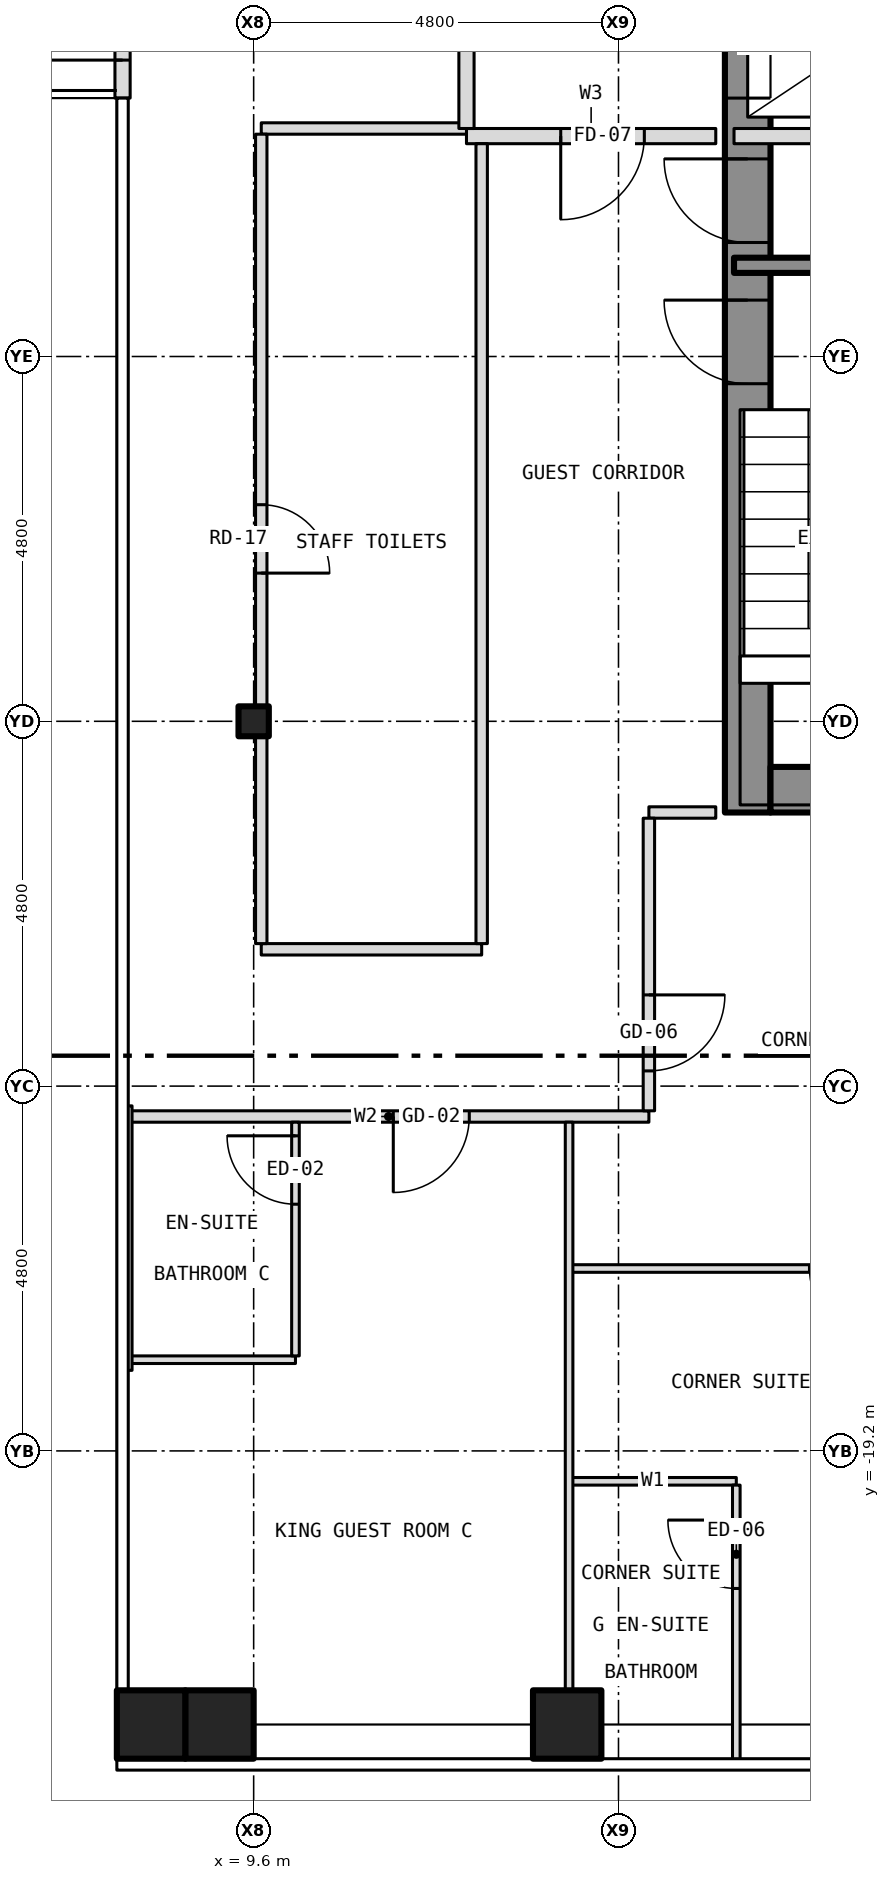
"""IFC4 building model, lengths in metres.
Left out: names, types, materials, properties, quantities, classifications, styles, units other than length and angle.
Written with IfcOpenShell. Run it as: python <this file> out.ifc"""

import sys

from ifc_helpers import new_model, si_unit, direction, frame, frame_2d, origin, origin_2d, place, context, subcontext, project, spatial, rectangle, hollow_rectangle, i_section, extrude, element, fill, save


model = new_model("IFC4")
c1 = context("Model", 3, precision=1e-05, world=origin(), true_north=direction((0.0, 1.0)))
c2 = subcontext(c1, "Body", "Model", "MODEL_VIEW")
j1 = project(units=[si_unit("LENGTHUNIT", "METRE"), si_unit("PLANEANGLEUNIT", "RADIAN")], contexts=[c1])
p1 = place(None, origin())
s1 = spatial("IfcSite", under=j1, at=p1, CompositionType="ELEMENT")
p2 = place(p1, origin())
s2 = spatial("IfcBuilding", under=s1, at=p2, CompositionType="ELEMENT")
p3 = place(p2, frame((0.0, 0.0, 131.0)))
s3 = spatial("IfcBuildingStorey", under=s2, at=p3, CompositionType="ELEMENT", Elevation=131.0)
for number, where, z_axis, x_axis in (
    (1, (9.15, -22.8, -0.15), (0.0, 0.0, 1.0), (1.0, 0.0, 0.0)),
    (2, (13.725, -22.8, -0.15), (0.0, 0.0, 1.0), (1.0, 0.0, 0.0)),
    (3, (8.25, -22.8, -0.15), (0.0, 0.0, 1.0), (1.0, 0.0, 0.0)),
):
    element("IfcColumn", number, at=place(p3, frame(where, z_axis=z_axis, x_axis=x_axis)), inside=s3, PredefinedType="COLUMN", context=c2, shape_type="SweptSolid", body=[
        extrude(hollow_rectangle(XDim=0.9, YDim=0.9, WallThickness=0.05, at=origin_2d()), origin(), (0.0, 0.0, 1.0), 3.5),
    ])
p4 = place(p3, frame((9.6, -9.6, -0.15), z_axis=(0.0, 0.0, 1.0), x_axis=(1.0, 0.0, 0.0)))
e4 = element("IfcColumn", 4, at=p4, inside=s3, PredefinedType="COLUMN", context=c2, shape_type="SweptSolid", body=[
    extrude(i_section(OverallWidth=0.399, OverallDepth=0.394, WebThickness=0.023, FlangeThickness=0.037, at=origin_2d()), origin(), (0.0, 0.0, 1.0), 3.5),
])
p5 = place(p3, frame((16.1, -10.8, 0.0), z_axis=(0.0, 0.0, 1.0), x_axis=(0.0, 1.0, 0.0)))
e5 = element("IfcWall", 5, at=p5, inside=s3, PredefinedType="SHEAR", context=c2, shape_type="SweptSolid", body=[
    extrude(rectangle(XDim=21.6, YDim=0.6, at=frame_2d((10.8, 0.0))), origin(), (0.0, 0.0, 1.0), 3.25),
])
p6 = place(p5, frame((9.4, 0.0, 0.0)))
e6 = element("IfcOpeningElement", 6, at=p6, cuts=e5, PredefinedType="OPENING", context=c2, shape_type="SweptSolid", body=[
    extrude(rectangle(XDim=1.1, YDim=2.1, at=frame_2d((0.55, 1.05))), frame((0.0, 0.312, 0.0), z_axis=(0.0, -1.0, 0.0), x_axis=(1.0, 0.0, 0.0)), (0.0, 0.0, 1.0), 0.624),
])
p7 = place(p5, frame((11.5, 0.0, 0.0)))
e7 = element("IfcOpeningElement", 7, at=p7, cuts=e5, PredefinedType="OPENING", context=c2, shape_type="SweptSolid", body=[
    extrude(rectangle(XDim=1.1, YDim=2.1, at=frame_2d((0.55, 1.05))), frame((0.0, 0.312, 0.0), z_axis=(0.0, -1.0, 0.0), x_axis=(1.0, 0.0, 0.0)), (0.0, 0.0, 1.0), 0.624),
])
p8 = place(p5, frame((13.6, 0.0, 0.0)))
e8 = element("IfcOpeningElement", 8, at=p8, cuts=e5, PredefinedType="OPENING", context=c2, shape_type="SweptSolid", body=[
    extrude(rectangle(XDim=1.1, YDim=2.1, at=frame_2d((0.55, 1.05))), frame((0.0, 0.312, 0.0), z_axis=(0.0, -1.0, 0.0), x_axis=(1.0, 0.0, 0.0)), (0.0, 0.0, 1.0), 0.624),
])
p9 = place(p5, frame((15.7, 0.0, 0.0)))
e9 = element("IfcOpeningElement", 9, at=p9, cuts=e5, PredefinedType="OPENING", context=c2, shape_type="SweptSolid", body=[
    extrude(rectangle(XDim=1.1, YDim=2.1, at=frame_2d((0.55, 1.05))), frame((0.0, 0.312, 0.0), z_axis=(0.0, -1.0, 0.0), x_axis=(1.0, 0.0, 0.0)), (0.0, 0.0, 1.0), 0.624),
])
p10 = place(p5, frame((17.8, 0.0, 0.0)))
e10 = element("IfcOpeningElement", 10, at=p10, cuts=e5, PredefinedType="OPENING", context=c2, shape_type="SweptSolid", body=[
    extrude(rectangle(XDim=1.1, YDim=2.1, at=frame_2d((0.55, 1.05))), frame((0.0, 0.312, 0.0), z_axis=(0.0, -1.0, 0.0), x_axis=(1.0, 0.0, 0.0)), (0.0, 0.0, 1.0), 0.624),
])
p11 = place(p5, frame((5.642, 0.0, 0.0)))
e11 = element("IfcOpeningElement", 11, at=p11, cuts=e5, PredefinedType="OPENING", context=c2, shape_type="SweptSolid", body=[
    extrude(rectangle(XDim=1.1, YDim=2.1, at=frame_2d((0.55, 1.05))), frame((0.0, 0.312, 0.0), z_axis=(0.0, -1.0, 0.0), x_axis=(1.0, 0.0, 0.0)), (0.0, 0.0, 1.0), 0.624),
])
p12 = place(p5, frame((7.5, 0.0, 0.0)))
e12 = element("IfcOpeningElement", 12, at=p12, cuts=e5, PredefinedType="OPENING", context=c2, shape_type="SweptSolid", body=[
    extrude(rectangle(XDim=1.1, YDim=2.1, at=frame_2d((0.55, 1.05))), frame((0.0, 0.312, 0.0), z_axis=(0.0, -1.0, 0.0), x_axis=(1.0, 0.0, 0.0)), (0.0, 0.0, 1.0), 0.624),
])
p13 = place(p3, frame((16.4, -10.5, 0.0), z_axis=(0.0, 0.0, 1.0), x_axis=(1.0, 0.0, 0.0)))
e13 = element("IfcWall", 13, at=p13, inside=s3, PredefinedType="SHEAR", context=c2, shape_type="SweptSolid", body=[
    extrude(rectangle(XDim=5.8, YDim=0.6, at=frame_2d((2.9, 0.0))), origin(), (0.0, 0.0, 1.0), 3.25),
])
p14 = place(p3, frame((7.875, -1.4, 0.0), z_axis=(0.0, 0.0, 1.0), x_axis=(0.0, 1.0, 0.0)))
e14 = element("IfcWall", 14, at=p14, inside=s3, PredefinedType="SOLIDWALL", context=c2, shape_type="SweptSolid", body=[
    extrude(rectangle(XDim=2.8, YDim=0.2, at=frame_2d((1.4, 0.0))), origin(), (0.0, 0.0, 1.0), 3.5),
])
p15 = place(p14, frame((0.5, 0.0, 0.0)))
e15 = element("IfcOpeningElement", 15, at=p15, cuts=e14, PredefinedType="OPENING", context=c2, shape_type="SweptSolid", body=[
    extrude(rectangle(XDim=1.8, YDim=2.1, at=frame_2d((0.9, 1.05))), frame((0.0, 0.112, 0.0), z_axis=(0.0, -1.0, 0.0), x_axis=(1.0, 0.0, 0.0)), (0.0, 0.0, 1.0), 0.224),
])
for number, where, z_axis, x_axis in (
    (16, (13.75, -19.6, 0.0), (0.0, 0.0, 1.0), (1.0, 0.0, 0.0)),
    (17, (7.95, -18.0, 0.0), (0.0, 0.0, 1.0), (1.0, 0.0, 0.0)),
):
    element("IfcWall", number, at=place(p3, frame(where, z_axis=z_axis, x_axis=x_axis)), inside=s3, PredefinedType="PARTITIONING", context=c2, shape_type="SweptSolid", body=[
        extrude(rectangle(XDim=2.2, YDim=0.1, at=frame_2d((1.1, 0.0))), origin(), (0.0, 0.0, 1.0), 3.35),
    ])
p16 = place(p3, frame((13.75, -16.8, 0.0), z_axis=(0.0, 0.0, 1.0), x_axis=(1.0, 0.0, 0.0)))
e18 = element("IfcWall", 18, at=p16, inside=s3, PredefinedType="PARTITIONING", context=c2, shape_type="SweptSolid", body=[
    extrude(rectangle(XDim=9.53, YDim=0.1, at=frame_2d((4.765, 0.0))), origin(), (0.0, 0.0, 1.0), 3.35),
])
p17 = place(p16, frame((3.163, 0.0, 0.0)))
e19 = element("IfcOpeningElement", 19, at=p17, cuts=e18, PredefinedType="OPENING", context=c2, shape_type="SweptSolid", body=[
    extrude(rectangle(XDim=0.9, YDim=2.1, at=frame_2d((0.45, 1.05))), frame((0.0, 0.062, 0.0), z_axis=(0.0, -1.0, 0.0), x_axis=(1.0, 0.0, 0.0)), (0.0, 0.0, 1.0), 0.124),
])
p18 = place(p3, frame((7.95, -14.8, 0.0), z_axis=(0.0, 0.0, 1.0), x_axis=(1.0, 0.0, 0.0)))
e20 = element("IfcWall", 20, at=p18, inside=s3, PredefinedType="PARTITIONING", context=c2, shape_type="SweptSolid", body=[
    extrude(rectangle(XDim=6.85, YDim=0.15, at=frame_2d((3.425, 0.0))), origin(), (0.0, 0.0, 1.0), 3.35),
])
p19 = place(p18, frame((3.487, 0.0, 0.0)))
e21 = element("IfcOpeningElement", 21, at=p19, cuts=e20, PredefinedType="OPENING", context=c2, shape_type="SweptSolid", body=[
    extrude(rectangle(XDim=1.0, YDim=2.1, at=frame_2d((0.5, 1.05))), frame((0.0, 0.087, 0.0), z_axis=(0.0, -1.0, 0.0), x_axis=(1.0, 0.0, 0.0)), (0.0, 0.0, 1.0), 0.174),
])
p20 = place(p3, frame((9.7, -12.6, 0.0), z_axis=(0.0, 0.0, 1.0), x_axis=(1.0, 0.0, 0.0)))
e22 = element("IfcWall", 22, at=p20, inside=s3, PredefinedType="PARTITIONING", context=c2, shape_type="SweptSolid", body=[
    extrude(rectangle(XDim=2.9, YDim=0.15, at=frame_2d((1.45, 0.0))), origin(), (0.0, 0.0, 1.0), 3.35),
])
p21 = place(p3, frame((14.8, -10.8, 0.0), z_axis=(0.0, 0.0, 1.0), x_axis=(1.0, 0.0, 0.0)))
e23 = element("IfcWall", 23, at=p21, inside=s3, PredefinedType="PARTITIONING", context=c2, shape_type="SweptSolid", body=[
    extrude(rectangle(XDim=0.88, YDim=0.15, at=frame_2d((0.44, 0.0))), origin(), (0.0, 0.0, 1.0), 3.35),
])
p22 = place(p3, frame((15.92, -3.6, 0.0), z_axis=(0.0, 0.0, 1.0), x_axis=(1.0, 0.0, 0.0)))
e24 = element("IfcWall", 24, at=p22, inside=s3, PredefinedType="SHEAR", context=c2, shape_type="SweptSolid", body=[
    extrude(rectangle(XDim=4.08, YDim=0.2, at=frame_2d((2.04, 0.0))), origin(), (0.0, 0.0, 1.0), 3.25),
])
p23 = place(p3, frame((12.4, -1.9, 0.0), z_axis=(0.0, 0.0, 1.0), x_axis=(1.0, 0.0, 0.0)))
e25 = element("IfcWall", 25, at=p23, inside=s3, PredefinedType="PARTITIONING", context=c2, shape_type="SweptSolid", body=[
    extrude(rectangle(XDim=3.28, YDim=0.2, at=frame_2d((1.64, 0.0))), origin(), (0.0, 0.0, 1.0), 3.35),
])
p24 = place(p23, frame((1.24, 0.0, 0.0)))
e26 = element("IfcOpeningElement", 26, at=p24, cuts=e25, PredefinedType="OPENING", context=c2, shape_type="SweptSolid", body=[
    extrude(rectangle(XDim=1.1, YDim=2.1, at=frame_2d((0.55, 1.05))), frame((0.0, 0.112, 0.0), z_axis=(0.0, -1.0, 0.0), x_axis=(1.0, 0.0, 0.0)), (0.0, 0.0, 1.0), 0.224),
])
p25 = place(p3, frame((15.92, -1.9, 0.0), z_axis=(0.0, 0.0, 1.0), x_axis=(1.0, 0.0, 0.0)))
e27 = element("IfcWall", 27, at=p25, inside=s3, PredefinedType="PARTITIONING", context=c2, shape_type="SweptSolid", body=[
    extrude(rectangle(XDim=6.76, YDim=0.2, at=frame_2d((3.38, 0.0))), origin(), (0.0, 0.0, 1.0), 3.25),
])
p26 = place(p25, frame((3.74, 0.0, 0.0)))
e28 = element("IfcOpeningElement", 28, at=p26, cuts=e27, PredefinedType="OPENING", context=c2, shape_type="SweptSolid", body=[
    extrude(rectangle(XDim=0.9, YDim=2.1, at=frame_2d((0.45, 1.05))), frame((0.0, 0.112, 0.0), z_axis=(0.0, -1.0, 0.0), x_axis=(1.0, 0.0, 0.0)), (0.0, 0.0, 1.0), 0.224),
])
p27 = place(p3, frame((9.7, -1.8, 0.0), z_axis=(0.0, 0.0, 1.0), x_axis=(1.0, 0.0, 0.0)))
e29 = element("IfcWall", 29, at=p27, inside=s3, PredefinedType="PARTITIONING", context=c2, shape_type="SweptSolid", body=[
    extrude(rectangle(XDim=2.7, YDim=0.15, at=frame_2d((1.35, 0.0))), origin(), (0.0, 0.0, 1.0), 3.35),
])
p28 = place(p3, frame((7.95, -18.14, 0.0), z_axis=(0.0, 0.0, 1.0), x_axis=(0.0, 1.0, 0.0)))
e30 = element("IfcWall", 30, at=p28, inside=s3, PredefinedType="PARTITIONING", context=c2, shape_type="SweptSolid", body=[
    extrude(rectangle(XDim=3.48, YDim=0.1, at=frame_2d((1.74, 0.0))), origin(), (0.0, 0.0, 1.0), 2.733),
])
p29 = place(p3, frame((9.7, -12.525, 0.0), z_axis=(0.0, 0.0, 1.0), x_axis=(0.0, 1.0, 0.0)))
e31 = element("IfcWall", 31, at=p29, inside=s3, PredefinedType="PARTITIONING", context=c2, shape_type="SweptSolid", body=[
    extrude(rectangle(XDim=2.726, YDim=0.15, at=frame_2d((1.363, 0.0))), origin(), (0.0, 0.0, 1.0), 2.728),
])
p30 = place(p3, frame((9.7, -9.799, 0.0), z_axis=(0.0, 0.0, 1.0), x_axis=(0.0, 1.0, 0.0)))
e32 = element("IfcWall", 32, at=p30, inside=s3, PredefinedType="PARTITIONING", context=c2, shape_type="SweptSolid", body=[
    extrude(rectangle(XDim=0.398, YDim=0.15, at=frame_2d((0.199, 0.0))), origin(), (0.0, 0.0, 1.0), 3.35),
])
p31 = place(p3, frame((9.7, -9.401, 0.0), z_axis=(0.0, 0.0, 1.0), x_axis=(0.0, 1.0, 0.0)))
e33 = element("IfcWall", 33, at=p31, inside=s3, PredefinedType="PARTITIONING", context=c2, shape_type="SweptSolid", body=[
    extrude(rectangle(XDim=7.526, YDim=0.15, at=frame_2d((3.763, 0.0))), origin(), (0.0, 0.0, 1.0), 2.728),
])
p32 = place(p31, frame((1.751, 0.0, 0.0)))
e34 = element("IfcOpeningElement", 34, at=p32, cuts=e33, PredefinedType="OPENING", context=c2, shape_type="SweptSolid", body=[
    extrude(rectangle(XDim=0.9, YDim=2.1, at=frame_2d((0.45, 1.05))), frame((0.0, 0.087, 0.0), z_axis=(0.0, -1.0, 0.0), x_axis=(1.0, 0.0, 0.0)), (0.0, 0.0, 1.0), 0.174),
])
p33 = place(p3, frame((10.15, -17.95, 0.0), z_axis=(0.0, 0.0, 1.0), x_axis=(0.0, 1.0, 0.0)))
e35 = element("IfcWall", 35, at=p33, inside=s3, PredefinedType="PARTITIONING", context=c2, shape_type="SweptSolid", body=[
    extrude(rectangle(XDim=3.075, YDim=0.1, at=frame_2d((1.538, 0.0))), origin(), (0.0, 0.0, 1.0), 3.35),
])
p34 = place(p33, frame((1.996, 0.0, 0.0)))
e36 = element("IfcOpeningElement", 36, at=p34, cuts=e35, PredefinedType="OPENING", context=c2, shape_type="SweptSolid", body=[
    extrude(rectangle(XDim=0.9, YDim=2.1, at=frame_2d((0.45, 1.05))), frame((0.0, 0.062, 0.0), z_axis=(0.0, -1.0, 0.0), x_axis=(1.0, 0.0, 0.0)), (0.0, 0.0, 1.0), 0.124),
])
p35 = place(p3, frame((12.4, -1.8, 0.0), z_axis=(0.0, 0.0, 1.0), x_axis=(0.0, 1.0, 0.0)))
e37 = element("IfcWall", 37, at=p35, inside=s3, PredefinedType="PARTITIONING", context=c2, shape_type="SweptSolid", body=[
    extrude(rectangle(XDim=4.0, YDim=0.2, at=frame_2d((2.0, 0.0))), origin(), (0.0, 0.0, 1.0), 3.35),
])
p36 = place(p35, frame((1.25, 0.0, 0.0)))
e38 = element("IfcOpeningElement", 38, at=p36, cuts=e37, PredefinedType="OPENING", context=c2, shape_type="SweptSolid", body=[
    extrude(rectangle(XDim=1.1, YDim=2.1, at=frame_2d((0.55, 1.05))), frame((0.0, 0.112, 0.0), z_axis=(0.0, -1.0, 0.0), x_axis=(1.0, 0.0, 0.0)), (0.0, 0.0, 1.0), 0.224),
])
p37 = place(p3, frame((12.6, -12.525, 0.0), z_axis=(0.0, 0.0, 1.0), x_axis=(0.0, 1.0, 0.0)))
e39 = element("IfcWall", 39, at=p37, inside=s3, PredefinedType="PARTITIONING", context=c2, shape_type="SweptSolid", body=[
    extrude(rectangle(XDim=10.525, YDim=0.15, at=frame_2d((5.262, 0.0))), origin(), (0.0, 0.0, 1.0), 3.35),
])
p38 = place(p3, frame((13.75, -22.68, 0.0), z_axis=(0.0, 0.0, 1.0), x_axis=(0.0, 1.0, 0.0)))
e40 = element("IfcWall", 40, at=p38, inside=s3, PredefinedType="PARTITIONING", context=c2, shape_type="SweptSolid", body=[
    extrude(rectangle(XDim=7.805, YDim=0.1, at=frame_2d((3.902, 0.0))), origin(), (0.0, 0.0, 1.0), 3.35),
])
p39 = place(p3, frame((14.8, -14.725, 0.0), z_axis=(0.0, 0.0, 1.0), x_axis=(0.0, 1.0, 0.0)))
e41 = element("IfcWall", 41, at=p39, inside=s3, PredefinedType="PARTITIONING", context=c2, shape_type="SweptSolid", body=[
    extrude(rectangle(XDim=3.85, YDim=0.15, at=frame_2d((1.925, 0.0))), origin(), (0.0, 0.0, 1.0), 3.35),
])
p40 = place(p39, frame((0.525, 0.0, 0.0)))
e42 = element("IfcOpeningElement", 42, at=p40, cuts=e41, PredefinedType="OPENING", context=c2, shape_type="SweptSolid", body=[
    extrude(rectangle(XDim=1.0, YDim=2.1, at=frame_2d((0.5, 1.05))), frame((0.0, 0.087, 0.0), z_axis=(0.0, -1.0, 0.0), x_axis=(1.0, 0.0, 0.0)), (0.0, 0.0, 1.0), 0.174),
])
p41 = place(p3, frame((15.95, -23.28, 0.0), z_axis=(0.0, 0.0, 1.0), x_axis=(0.0, 1.0, 0.0)))
e43 = element("IfcWall", 43, at=p41, inside=s3, PredefinedType="PARTITIONING", context=c2, shape_type="SweptSolid", body=[
    extrude(rectangle(XDim=3.63, YDim=0.1, at=frame_2d((1.815, 0.0))), origin(), (0.0, 0.0, 1.0), 3.35),
])
p42 = place(p41, frame((2.27, 0.0, 0.0)))
e44 = element("IfcOpeningElement", 44, at=p42, cuts=e43, PredefinedType="OPENING", context=c2, shape_type="SweptSolid", body=[
    extrude(rectangle(XDim=0.9, YDim=2.1, at=frame_2d((0.45, 1.05))), frame((0.0, 0.062, 0.0), z_axis=(0.0, -1.0, 0.0), x_axis=(1.0, 0.0, 0.0)), (0.0, 0.0, 1.0), 0.124),
])
p43 = place(p15, origin())
e45 = element("IfcDoor", 45, at=p43, inside=s3, OperationType="DOUBLE_DOOR_DOUBLE_SWING", PredefinedType="DOOR", context=c2, shape_type="SweptSolid", body=[
    extrude(rectangle(XDim=1.8, YDim=2.1, at=frame_2d((0.9, 1.05))), frame((0.0, 0.025, 0.0), z_axis=(0.0, -1.0, 0.0), x_axis=(1.0, 0.0, 0.0)), (0.0, 0.0, 1.0), 0.05),
])
fill(e15, e45)
p44 = place(p6, origin())
e46 = element("IfcDoor", 46, at=p44, inside=s3, OperationType="SLIDING_TO_LEFT", PredefinedType="DOOR", context=c2, shape_type="SweptSolid", body=[
    extrude(rectangle(XDim=1.1, YDim=2.1, at=frame_2d((0.55, 1.05))), frame((0.0, 0.025, 0.0), z_axis=(0.0, -1.0, 0.0), x_axis=(1.0, 0.0, 0.0)), (0.0, 0.0, 1.0), 0.05),
])
fill(e6, e46)
p45 = place(p11, origin())
e47 = element("IfcDoor", 47, at=p45, inside=s3, OperationType="SINGLE_SWING_RIGHT", PredefinedType="DOOR", context=c2, shape_type="SweptSolid", body=[
    extrude(rectangle(XDim=1.1, YDim=2.1, at=frame_2d((0.55, 1.05))), frame((0.0, 0.025, 0.0), z_axis=(0.0, -1.0, 0.0), x_axis=(1.0, 0.0, 0.0)), (0.0, 0.0, 1.0), 0.05),
])
fill(e11, e47)
p46 = place(p12, origin())
e48 = element("IfcDoor", 48, at=p46, inside=s3, OperationType="SINGLE_SWING_RIGHT", PredefinedType="DOOR", context=c2, shape_type="SweptSolid", body=[
    extrude(rectangle(XDim=1.1, YDim=2.1, at=frame_2d((0.55, 1.05))), frame((0.0, 0.025, 0.0), z_axis=(0.0, -1.0, 0.0), x_axis=(1.0, 0.0, 0.0)), (0.0, 0.0, 1.0), 0.05),
])
fill(e12, e48)
p47 = place(p24, origin())
e49 = element("IfcDoor", 49, at=p47, inside=s3, OperationType="SINGLE_SWING_LEFT", PredefinedType="DOOR", context=c2, shape_type="SweptSolid", body=[
    extrude(rectangle(XDim=1.1, YDim=2.1, at=frame_2d((0.55, 1.05))), frame((0.0, 0.025, 0.0), z_axis=(0.0, -1.0, 0.0), x_axis=(1.0, 0.0, 0.0)), (0.0, 0.0, 1.0), 0.05),
])
fill(e26, e49)
p48 = place(p19, origin())
e50 = element("IfcDoor", 50, at=p48, inside=s3, OperationType="SINGLE_SWING_LEFT", PredefinedType="DOOR", context=c2, shape_type="SweptSolid", body=[
    extrude(rectangle(XDim=1.0, YDim=2.1, at=frame_2d((0.5, 1.05))), frame((0.0, 0.025, 0.0), z_axis=(0.0, -1.0, 0.0), x_axis=(1.0, 0.0, 0.0)), (0.0, 0.0, 1.0), 0.05),
])
fill(e21, e50)
p49 = place(p34, origin())
e51 = element("IfcDoor", 51, at=p49, inside=s3, OperationType="SINGLE_SWING_RIGHT", PredefinedType="DOOR", context=c2, shape_type="SweptSolid", body=[
    extrude(rectangle(XDim=0.9, YDim=2.1, at=frame_2d((0.45, 1.05))), frame((0.0, 0.025, 0.0), z_axis=(0.0, -1.0, 0.0), x_axis=(1.0, 0.0, 0.0)), (0.0, 0.0, 1.0), 0.05),
])
fill(e36, e51)
p50 = place(p40, origin())
e52 = element("IfcDoor", 52, at=p50, inside=s3, OperationType="SINGLE_SWING_RIGHT", PredefinedType="DOOR", context=c2, shape_type="SweptSolid", body=[
    extrude(rectangle(XDim=1.0, YDim=2.1, at=frame_2d((0.5, 1.05))), frame((0.0, 0.025, 0.0), z_axis=(0.0, -1.0, 0.0), x_axis=(1.0, 0.0, 0.0)), (0.0, 0.0, 1.0), 0.05),
])
fill(e42, e52)
p51 = place(p17, origin())
e53 = element("IfcDoor", 53, at=p51, inside=s3, OperationType="SINGLE_SWING_RIGHT", PredefinedType="DOOR", context=c2, shape_type="SweptSolid", body=[
    extrude(rectangle(XDim=0.9, YDim=2.1, at=frame_2d((0.45, 1.05))), frame((0.0, 0.025, 0.0), z_axis=(0.0, -1.0, 0.0), x_axis=(1.0, 0.0, 0.0)), (0.0, 0.0, 1.0), 0.05),
])
fill(e19, e53)
p52 = place(p42, origin())
e54 = element("IfcDoor", 54, at=p52, inside=s3, OperationType="SINGLE_SWING_RIGHT", PredefinedType="DOOR", context=c2, shape_type="SweptSolid", body=[
    extrude(rectangle(XDim=0.9, YDim=2.1, at=frame_2d((0.45, 1.05))), frame((0.0, 0.025, 0.0), z_axis=(0.0, -1.0, 0.0), x_axis=(1.0, 0.0, 0.0)), (0.0, 0.0, 1.0), 0.05),
])
fill(e44, e54)
p53 = place(p32, origin())
e55 = element("IfcDoor", 55, at=p53, inside=s3, OperationType="SINGLE_SWING_LEFT", PredefinedType="DOOR", context=c2, shape_type="SweptSolid", body=[
    extrude(rectangle(XDim=0.9, YDim=2.1, at=frame_2d((0.45, 1.05))), frame((0.0, 0.025, 0.0), z_axis=(0.0, -1.0, 0.0), x_axis=(1.0, 0.0, 0.0)), (0.0, 0.0, 1.0), 0.05),
])
fill(e34, e55)
save(model, sys.argv[1])
